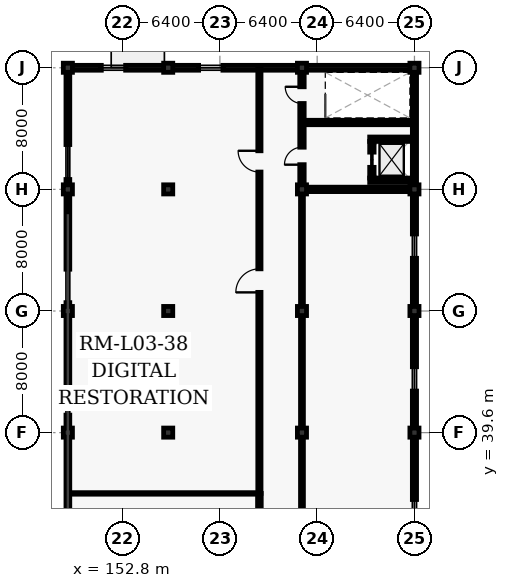
"""IFC4 building model, lengths in metres.
Left out: names, types, materials, properties, quantities, classifications, styles, units other than length and angle.
Written with IfcOpenShell. Run it as: python <this file> out.ifc"""

import sys

from ifc_helpers import new_model, si_unit, direction, frame, frame_2d, origin, origin_2d, place, context, subcontext, project, spatial, rectangle, extrude, element, fill, save


model = new_model("IFC4")
c1 = context("Model", 3, precision=1e-05, world=origin(), true_north=direction((0.0, 1.0)))
c2 = subcontext(c1, "Body", "Model", "MODEL_VIEW")
j1 = project(units=[si_unit("LENGTHUNIT", "METRE"), si_unit("PLANEANGLEUNIT", "RADIAN")], contexts=[c1])
p1 = place(None, origin())
s1 = spatial("IfcSite", under=j1, at=p1, CompositionType="ELEMENT")
p2 = place(p1, origin())
s2 = spatial("IfcBuilding", under=s1, at=p2, CompositionType="ELEMENT")
p3 = place(p2, frame((0.0, 0.0, 15.6)))
s3 = spatial("IfcBuildingStorey", under=s2, at=p3, CompositionType="ELEMENT", Elevation=15.6)
for number, where, z_axis, x_axis in (
    (1, (149.2, 39.6, 0.0), (0.0, 0.0, 1.0), (1.0, 0.0, 0.0)),
    (2, (149.2, 47.6, 0.0), (0.0, 0.0, 1.0), (1.0, 0.0, 0.0)),
    (3, (149.2, 55.6, 0.0), (0.0, 0.0, 1.0), (1.0, 0.0, 0.0)),
    (4, (149.2, 63.6, 0.0), (0.0, 0.0, 1.0), (1.0, 0.0, 0.0)),
    (5, (155.8, 39.6, 0.0), (0.0, 0.0, 1.0), (1.0, 0.0, 0.0)),
    (6, (155.8, 47.6, 0.0), (0.0, 0.0, 1.0), (1.0, 0.0, 0.0)),
    (7, (155.8, 55.6, 0.0), (0.0, 0.0, 1.0), (1.0, 0.0, 0.0)),
    (8, (155.8, 63.6, 0.0), (0.0, 0.0, 1.0), (1.0, 0.0, 0.0)),
    (9, (164.6, 39.6, 0.0), (0.0, 0.0, 1.0), (1.0, 0.0, 0.0)),
    (10, (164.6, 47.6, 0.0), (0.0, 0.0, 1.0), (1.0, 0.0, 0.0)),
    (11, (164.6, 55.6, 0.0), (0.0, 0.0, 1.0), (1.0, 0.0, 0.0)),
    (12, (164.6, 63.6, 0.0), (0.0, 0.0, 1.0), (1.0, 0.0, 0.0)),
    (13, (172.0, 39.6, 0.0), (0.0, 0.0, 1.0), (1.0, 0.0, 0.0)),
    (14, (172.0, 47.6, 0.0), (0.0, 0.0, 1.0), (1.0, 0.0, 0.0)),
    (15, (172.0, 55.6, 0.0), (0.0, 0.0, 1.0), (1.0, 0.0, 0.0)),
    (16, (172.0, 63.6, 0.0), (0.0, 0.0, 1.0), (1.0, 0.0, 0.0)),
):
    element("IfcColumn", number, at=place(p3, frame(where, z_axis=z_axis, x_axis=x_axis)), inside=s3, PredefinedType="COLUMN", context=c2, shape_type="SweptSolid", body=[
        extrude(rectangle(XDim=0.6, YDim=0.6, at=origin_2d()), origin(), (0.0, 0.0, 1.0), 4.8),
    ])
p4 = place(p3, frame((149.2, 15.6, 0.0), z_axis=(0.0, 0.0, 1.0), x_axis=(0.0, 1.0, 0.0)))
e17 = element("IfcWall", 17, at=p4, inside=s3, PredefinedType="SOLIDWALL", context=c2, shape_type="SweptSolid", body=[
    extrude(rectangle(XDim=48.0, YDim=0.25, at=frame_2d((24.0, 0.0))), origin(), (0.0, 0.0, 1.0), 3.705),
])
p5 = place(p4, frame((2.2, 0.0, 0.8)))
e18 = element("IfcOpeningElement", 18, at=p5, cuts=e17, PredefinedType="OPENING", context=c2, shape_type="SweptSolid", body=[
    extrude(rectangle(XDim=1.8, YDim=2.15, at=frame_2d((0.9, 1.075))), frame((0.0, 0.135, 0.0), z_axis=(0.0, -1.0, 0.0), x_axis=(1.0, 0.0, 0.0)), (0.0, 0.0, 1.0), 0.27),
])
p6 = place(p4, frame((9.6, 0.0, 0.8)))
e19 = element("IfcOpeningElement", 19, at=p6, cuts=e17, PredefinedType="OPENING", context=c2, shape_type="SweptSolid", body=[
    extrude(rectangle(XDim=1.9, YDim=2.2, at=frame_2d((0.95, 1.1))), frame((0.0, 0.135, 0.0), z_axis=(0.0, -1.0, 0.0), x_axis=(1.0, 0.0, 0.0)), (0.0, 0.0, 1.0), 0.27),
])
p7 = place(p4, frame((17.0, 0.0, 0.8)))
e20 = element("IfcOpeningElement", 20, at=p7, cuts=e17, PredefinedType="OPENING", context=c2, shape_type="SweptSolid", body=[
    extrude(rectangle(XDim=2.0, YDim=2.2, at=frame_2d((1.0, 1.1))), frame((0.0, 0.135, 0.0), z_axis=(0.0, -1.0, 0.0), x_axis=(1.0, 0.0, 0.0)), (0.0, 0.0, 1.0), 0.27),
])
p8 = place(p4, frame((25.15, 0.0, 0.8)))
e21 = element("IfcOpeningElement", 21, at=p8, cuts=e17, PredefinedType="OPENING", context=c2, shape_type="SweptSolid", body=[
    extrude(rectangle(XDim=2.1, YDim=2.2, at=frame_2d((1.05, 1.1))), frame((0.0, 0.135, 0.0), z_axis=(0.0, -1.0, 0.0), x_axis=(1.0, 0.0, 0.0)), (0.0, 0.0, 1.0), 0.27),
])
p9 = place(p4, frame((32.55, 0.0, 0.8)))
e22 = element("IfcOpeningElement", 22, at=p9, cuts=e17, PredefinedType="OPENING", context=c2, shape_type="SweptSolid", body=[
    extrude(rectangle(XDim=2.2, YDim=2.25, at=frame_2d((1.1, 1.125))), frame((0.0, 0.135, 0.0), z_axis=(0.0, -1.0, 0.0), x_axis=(1.0, 0.0, 0.0)), (0.0, 0.0, 1.0), 0.27),
])
p10 = place(p4, frame((40.65, 0.0, 0.8)))
e23 = element("IfcOpeningElement", 23, at=p10, cuts=e17, PredefinedType="OPENING", context=c2, shape_type="SweptSolid", body=[
    extrude(rectangle(XDim=2.3, YDim=2.25, at=frame_2d((1.15, 1.125))), frame((0.0, 0.135, 0.0), z_axis=(0.0, -1.0, 0.0), x_axis=(1.0, 0.0, 0.0)), (0.0, 0.0, 1.0), 0.27),
])
p11 = place(p3, frame((149.2, 63.6, 0.0), z_axis=(0.0, 0.0, 1.0), x_axis=(1.0, 0.0, 0.0)))
e24 = element("IfcWall", 24, at=p11, inside=s3, PredefinedType="SOLIDWALL", context=c2, shape_type="SweptSolid", body=[
    extrude(rectangle(XDim=22.8, YDim=0.32, at=frame_2d((11.4, 0.0))), origin(), (0.0, 0.0, 1.0), 3.705),
])
p12 = place(p11, frame((2.2, 0.0, 0.9)))
e25 = element("IfcOpeningElement", 25, at=p12, cuts=e24, PredefinedType="OPENING", context=c2, shape_type="SweptSolid", body=[
    extrude(rectangle(XDim=1.6, YDim=1.65, at=frame_2d((0.8, 0.825))), frame((0.0, 0.17, 0.0), z_axis=(0.0, -1.0, 0.0), x_axis=(1.0, 0.0, 0.0)), (0.0, 0.0, 1.0), 0.34),
])
p13 = place(p11, frame((8.6, 0.0, 0.9)))
e26 = element("IfcOpeningElement", 26, at=p13, cuts=e24, PredefinedType="OPENING", context=c2, shape_type="SweptSolid", body=[
    extrude(rectangle(XDim=1.6, YDim=1.65, at=frame_2d((0.8, 0.825))), frame((0.0, 0.17, 0.0), z_axis=(0.0, -1.0, 0.0), x_axis=(1.0, 0.0, 0.0)), (0.0, 0.0, 1.0), 0.34),
])
p14 = place(p3, frame((172.0, 63.6, 0.0), z_axis=(0.0, 0.0, 1.0), x_axis=(0.0, -1.0, 0.0)))
e27 = element("IfcWall", 27, at=p14, inside=s3, PredefinedType="SOLIDWALL", context=c2, shape_type="SweptSolid", body=[
    extrude(rectangle(XDim=56.0, YDim=0.275, at=frame_2d((28.0, 0.0))), origin(), (0.0, 0.0, 1.0), 3.705),
])
p15 = place(p14, frame((10.933, 0.0, 0.8)))
e28 = element("IfcOpeningElement", 28, at=p15, cuts=e27, PredefinedType="OPENING", context=c2, shape_type="SweptSolid", body=[
    extrude(rectangle(XDim=1.6, YDim=1.65, at=frame_2d((0.8, 0.825))), frame((0.0, 0.147, 0.0), z_axis=(0.0, -1.0, 0.0), x_axis=(1.0, 0.0, 0.0)), (0.0, 0.0, 1.0), 0.295),
])
p16 = place(p14, frame((19.667, 0.0, 0.8)))
e29 = element("IfcOpeningElement", 29, at=p16, cuts=e27, PredefinedType="OPENING", context=c2, shape_type="SweptSolid", body=[
    extrude(rectangle(XDim=1.6, YDim=1.65, at=frame_2d((0.8, 0.825))), frame((0.0, 0.147, 0.0), z_axis=(0.0, -1.0, 0.0), x_axis=(1.0, 0.0, 0.0)), (0.0, 0.0, 1.0), 0.295),
])
p17 = place(p14, frame((28.4, 0.0, 0.8)))
e30 = element("IfcOpeningElement", 30, at=p17, cuts=e27, PredefinedType="OPENING", context=c2, shape_type="SweptSolid", body=[
    extrude(rectangle(XDim=1.6, YDim=1.65, at=frame_2d((0.8, 0.825))), frame((0.0, 0.147, 0.0), z_axis=(0.0, -1.0, 0.0), x_axis=(1.0, 0.0, 0.0)), (0.0, 0.0, 1.0), 0.295),
])
p18 = place(p14, frame((37.133, 0.0, 0.8)))
e31 = element("IfcOpeningElement", 31, at=p18, cuts=e27, PredefinedType="OPENING", context=c2, shape_type="SweptSolid", body=[
    extrude(rectangle(XDim=1.6, YDim=1.65, at=frame_2d((0.8, 0.825))), frame((0.0, 0.147, 0.0), z_axis=(0.0, -1.0, 0.0), x_axis=(1.0, 0.0, 0.0)), (0.0, 0.0, 1.0), 0.295),
])
p19 = place(p14, frame((45.867, 0.0, 0.8)))
e32 = element("IfcOpeningElement", 32, at=p19, cuts=e27, PredefinedType="OPENING", context=c2, shape_type="SweptSolid", body=[
    extrude(rectangle(XDim=1.6, YDim=1.65, at=frame_2d((0.8, 0.825))), frame((0.0, 0.147, 0.0), z_axis=(0.0, -1.0, 0.0), x_axis=(1.0, 0.0, 0.0)), (0.0, 0.0, 1.0), 0.295),
])
p20 = place(p3, frame((164.902, 55.6, 0.0), z_axis=(0.0, 0.0, 1.0), x_axis=(1.0, 0.0, 0.0)))
e33 = element("IfcWall", 33, at=p20, inside=s3, PredefinedType="SHEAR", context=c2, shape_type="SweptSolid", body=[
    extrude(rectangle(XDim=6.796, YDim=0.29, at=frame_2d((3.398, 0.0))), origin(), (0.0, 0.0, 1.0), 4.555),
])
p21 = place(p3, frame((164.6, 55.902, 0.0), z_axis=(0.0, 0.0, 1.0), x_axis=(0.0, 1.0, 0.0)))
e34 = element("IfcWall", 34, at=p21, inside=s3, PredefinedType="SHEAR", context=c2, shape_type="SweptSolid", body=[
    extrude(rectangle(XDim=7.396, YDim=0.29, at=frame_2d((3.698, 0.0))), origin(), (0.0, 0.0, 1.0), 4.555),
])
p22 = place(p21, frame((5.348, 0.0, 0.0)))
e35 = element("IfcOpeningElement", 35, at=p22, cuts=e34, PredefinedType="OPENING", context=c2, shape_type="SweptSolid", body=[
    extrude(rectangle(XDim=1.1, YDim=2.15, at=frame_2d((0.55, 1.075))), frame((0.0, 0.155, 0.0), z_axis=(0.0, -1.0, 0.0), x_axis=(1.0, 0.0, 0.0)), (0.0, 0.0, 1.0), 0.31),
])
p23 = place(p21, frame((1.323, 0.0, 0.0)))
e36 = element("IfcOpeningElement", 36, at=p23, cuts=e34, PredefinedType="OPENING", context=c2, shape_type="SweptSolid", body=[
    extrude(rectangle(XDim=1.15, YDim=2.2, at=frame_2d((0.575, 1.1))), frame((0.0, 0.155, 0.0), z_axis=(0.0, -1.0, 0.0), x_axis=(1.0, 0.0, 0.0)), (0.0, 0.0, 1.0), 0.31),
])
p24 = place(p3, frame((164.745, 60.0, 0.0), z_axis=(0.0, 0.0, 1.0), x_axis=(1.0, 0.0, 0.0)))
e37 = element("IfcWall", 37, at=p24, inside=s3, PredefinedType="SHEAR", context=c2, shape_type="SweptSolid", body=[
    extrude(rectangle(XDim=7.11, YDim=0.29, at=frame_2d((3.555, 0.0))), origin(), (0.0, 0.0, 1.0), 4.555),
])
for number, where, z_axis, x_axis in (
    (38, (169.055, 56.2, 0.0), (0.0, 0.0, 1.0), (1.0, 0.0, 0.0)),
    (39, (169.055, 58.9, 0.0), (0.0, 0.0, 1.0), (1.0, 0.0, 0.0)),
):
    element("IfcWall", number, at=place(p3, frame(where, z_axis=z_axis, x_axis=x_axis)), inside=s3, PredefinedType="SHEAR", context=c2, shape_type="SweptSolid", body=[
        extrude(rectangle(XDim=2.89, YDim=0.29, at=frame_2d((1.445, 0.0))), origin(), (0.0, 0.0, 1.0), 4.555),
    ])
p25 = place(p3, frame((169.2, 56.345, 0.0), z_axis=(0.0, 0.0, 1.0), x_axis=(0.0, 1.0, 0.0)))
e40 = element("IfcWall", 40, at=p25, inside=s3, PredefinedType="SHEAR", context=c2, shape_type="SweptSolid", body=[
    extrude(rectangle(XDim=2.41, YDim=0.29, at=frame_2d((1.205, 0.0))), origin(), (0.0, 0.0, 1.0), 4.555),
])
p26 = place(p25, frame((0.705, 0.0, 0.0)))
e41 = element("IfcOpeningElement", 41, at=p26, cuts=e40, PredefinedType="OPENING", context=c2, shape_type="SweptSolid", body=[
    extrude(rectangle(XDim=1.0, YDim=2.15, at=frame_2d((0.5, 1.075))), frame((0.0, 0.155, 0.0), z_axis=(0.0, -1.0, 0.0), x_axis=(1.0, 0.0, 0.0)), (0.0, 0.0, 1.0), 0.31),
])
p27 = place(p3, frame((161.8, 7.6, 0.0), z_axis=(0.0, 0.0, 1.0), x_axis=(0.0, 1.0, 0.0)))
e42 = element("IfcWall", 42, at=p27, inside=s3, PredefinedType="PARTITIONING", context=c2, shape_type="SweptSolid", body=[
    extrude(rectangle(XDim=28.0, YDim=0.24, at=frame_2d((14.0, 0.0))), origin(), (0.0, 0.0, 1.0), 4.555),
])
p28 = place(p27, frame((13.475, 0.0, 0.0)))
e43 = element("IfcOpeningElement", 43, at=p28, cuts=e42, PredefinedType="OPENING", context=c2, shape_type="SweptSolid", body=[
    extrude(rectangle(XDim=1.05, YDim=2.15, at=frame_2d((0.525, 1.075))), frame((0.0, 0.13, 0.0), z_axis=(0.0, -1.0, 0.0), x_axis=(1.0, 0.0, 0.0)), (0.0, 0.0, 1.0), 0.26),
])
p29 = place(p27, frame((21.14, 0.0, 0.0)))
e44 = element("IfcOpeningElement", 44, at=p29, cuts=e42, PredefinedType="OPENING", context=c2, shape_type="SweptSolid", body=[
    extrude(rectangle(XDim=1.4, YDim=2.25, at=frame_2d((0.7, 1.125))), frame((0.0, 0.13, 0.0), z_axis=(0.0, -1.0, 0.0), x_axis=(1.0, 0.0, 0.0)), (0.0, 0.0, 1.0), 0.26),
])
p30 = place(p3, frame((161.8, 35.6, 0.0), z_axis=(0.0, 0.0, 1.0), x_axis=(0.0, 1.0, 0.0)))
e45 = element("IfcWall", 45, at=p30, inside=s3, PredefinedType="PARTITIONING", context=c2, shape_type="SweptSolid", body=[
    extrude(rectangle(XDim=28.0, YDim=0.21, at=frame_2d((14.0, 0.0))), origin(), (0.0, 0.0, 1.0), 4.555),
])
p31 = place(p30, frame((13.225, 0.0, 0.0)))
e46 = element("IfcOpeningElement", 46, at=p31, cuts=e45, PredefinedType="OPENING", context=c2, shape_type="SweptSolid", body=[
    extrude(rectangle(XDim=1.55, YDim=2.25, at=frame_2d((0.775, 1.125))), frame((0.0, 0.115, 0.0), z_axis=(0.0, -1.0, 0.0), x_axis=(1.0, 0.0, 0.0)), (0.0, 0.0, 1.0), 0.23),
])
p32 = place(p30, frame((21.14, 0.0, 0.0)))
e47 = element("IfcOpeningElement", 47, at=p32, cuts=e45, PredefinedType="OPENING", context=c2, shape_type="SweptSolid", body=[
    extrude(rectangle(XDim=1.4, YDim=2.25, at=frame_2d((0.7, 1.125))), frame((0.0, 0.115, 0.0), z_axis=(0.0, -1.0, 0.0), x_axis=(1.0, 0.0, 0.0)), (0.0, 0.0, 1.0), 0.23),
])
p33 = place(p3, frame((164.6, 55.298, 0.0), z_axis=(0.0, 0.0, 1.0), x_axis=(0.0, -1.0, 0.0)))
e48 = element("IfcWall", 48, at=p33, inside=s3, PredefinedType="PARTITIONING", context=c2, shape_type="SweptSolid", body=[
    extrude(rectangle(XDim=47.396, YDim=0.19, at=frame_2d((23.698, 0.0))), origin(), (0.0, 0.0, 1.0), 3.705),
])
p34 = place(p33, frame((24.18, 0.0, 0.0)))
e49 = element("IfcOpeningElement", 49, at=p34, cuts=e48, PredefinedType="OPENING", context=c2, shape_type="SweptSolid", body=[
    extrude(rectangle(XDim=1.6, YDim=2.3, at=frame_2d((0.8, 1.15))), frame((0.0, 0.105, 0.0), z_axis=(0.0, -1.0, 0.0), x_axis=(1.0, 0.0, 0.0)), (0.0, 0.0, 1.0), 0.21),
])
p35 = place(p33, frame((36.269, 0.0, 0.0)))
e50 = element("IfcOpeningElement", 50, at=p35, cuts=e48, PredefinedType="OPENING", context=c2, shape_type="SweptSolid", body=[
    extrude(rectangle(XDim=1.4, YDim=2.25, at=frame_2d((0.7, 1.125))), frame((0.0, 0.105, 0.0), z_axis=(0.0, -1.0, 0.0), x_axis=(1.0, 0.0, 0.0)), (0.0, 0.0, 1.0), 0.21),
])
p36 = place(p3, frame((149.2, 35.6, 0.0), z_axis=(0.0, 0.0, 1.0), x_axis=(1.0, 0.0, 0.0)))
e51 = element("IfcWall", 51, at=p36, inside=s3, PredefinedType="PARTITIONING", context=c2, shape_type="SweptSolid", body=[
    extrude(rectangle(XDim=12.6, YDim=0.1, at=frame_2d((6.3, 0.0))), origin(), (0.0, 0.0, 1.0), 4.005),
])
p37 = place(p8, origin())
e52 = element("IfcWindow", 52, at=p37, inside=s3, PartitioningType="SINGLE_PANEL", PredefinedType="WINDOW", context=c2, shape_type="SweptSolid", body=[
    extrude(rectangle(XDim=2.1, YDim=2.2, at=frame_2d((1.05, 1.1))), frame((0.0, 0.03, 0.0), z_axis=(0.0, -1.0, 0.0), x_axis=(1.0, 0.0, 0.0)), (0.0, 0.0, 1.0), 0.06),
])
fill(e21, e52)
p38 = place(p9, origin())
e53 = element("IfcWindow", 53, at=p38, inside=s3, PartitioningType="SINGLE_PANEL", PredefinedType="WINDOW", context=c2, shape_type="SweptSolid", body=[
    extrude(rectangle(XDim=2.2, YDim=2.25, at=frame_2d((1.1, 1.125))), frame((0.0, 0.03, 0.0), z_axis=(0.0, -1.0, 0.0), x_axis=(1.0, 0.0, 0.0)), (0.0, 0.0, 1.0), 0.06),
])
fill(e22, e53)
p39 = place(p10, origin())
e54 = element("IfcWindow", 54, at=p39, inside=s3, PartitioningType="SINGLE_PANEL", PredefinedType="WINDOW", context=c2, shape_type="SweptSolid", body=[
    extrude(rectangle(XDim=2.3, YDim=2.25, at=frame_2d((1.15, 1.125))), frame((0.0, 0.03, 0.0), z_axis=(0.0, -1.0, 0.0), x_axis=(1.0, 0.0, 0.0)), (0.0, 0.0, 1.0), 0.06),
])
fill(e23, e54)
p40 = place(p12, origin())
e55 = element("IfcWindow", 55, at=p40, inside=s3, PartitioningType="SINGLE_PANEL", PredefinedType="WINDOW", context=c2, shape_type="SweptSolid", body=[
    extrude(rectangle(XDim=1.6, YDim=1.65, at=frame_2d((0.8, 0.825))), frame((0.0, 0.03, 0.0), z_axis=(0.0, -1.0, 0.0), x_axis=(1.0, 0.0, 0.0)), (0.0, 0.0, 1.0), 0.06),
])
fill(e25, e55)
p41 = place(p13, origin())
e56 = element("IfcWindow", 56, at=p41, inside=s3, PartitioningType="SINGLE_PANEL", PredefinedType="WINDOW", context=c2, shape_type="SweptSolid", body=[
    extrude(rectangle(XDim=1.6, YDim=1.65, at=frame_2d((0.8, 0.825))), frame((0.0, 0.03, 0.0), z_axis=(0.0, -1.0, 0.0), x_axis=(1.0, 0.0, 0.0)), (0.0, 0.0, 1.0), 0.06),
])
fill(e26, e56)
p42 = place(p15, origin())
e57 = element("IfcWindow", 57, at=p42, inside=s3, PartitioningType="SINGLE_PANEL", PredefinedType="WINDOW", context=c2, shape_type="SweptSolid", body=[
    extrude(rectangle(XDim=1.6, YDim=1.65, at=frame_2d((0.8, 0.825))), frame((0.0, 0.03, 0.0), z_axis=(0.0, -1.0, 0.0), x_axis=(1.0, 0.0, 0.0)), (0.0, 0.0, 1.0), 0.06),
])
fill(e28, e57)
p43 = place(p16, origin())
e58 = element("IfcWindow", 58, at=p43, inside=s3, PartitioningType="SINGLE_PANEL", PredefinedType="WINDOW", context=c2, shape_type="SweptSolid", body=[
    extrude(rectangle(XDim=1.6, YDim=1.65, at=frame_2d((0.8, 0.825))), frame((0.0, 0.03, 0.0), z_axis=(0.0, -1.0, 0.0), x_axis=(1.0, 0.0, 0.0)), (0.0, 0.0, 1.0), 0.06),
])
fill(e29, e58)
p44 = place(p17, origin())
e59 = element("IfcWindow", 59, at=p44, inside=s3, PartitioningType="SINGLE_PANEL", PredefinedType="WINDOW", context=c2, shape_type="SweptSolid", body=[
    extrude(rectangle(XDim=1.6, YDim=1.65, at=frame_2d((0.8, 0.825))), frame((0.0, 0.03, 0.0), z_axis=(0.0, -1.0, 0.0), x_axis=(1.0, 0.0, 0.0)), (0.0, 0.0, 1.0), 0.06),
])
fill(e30, e59)
p45 = place(p22, origin())
e60 = element("IfcDoor", 60, at=p45, inside=s3, OperationType="SINGLE_SWING_RIGHT", PredefinedType="DOOR", context=c2, shape_type="SweptSolid", body=[
    extrude(rectangle(XDim=1.1, YDim=2.15, at=frame_2d((0.55, 1.075))), frame((0.0, 0.025, 0.0), z_axis=(0.0, -1.0, 0.0), x_axis=(1.0, 0.0, 0.0)), (0.0, 0.0, 1.0), 0.05),
])
fill(e35, e60)
p46 = place(p23, origin())
e61 = element("IfcDoor", 61, at=p46, inside=s3, OperationType="SINGLE_SWING_LEFT", PredefinedType="DOOR", context=c2, shape_type="SweptSolid", body=[
    extrude(rectangle(XDim=1.15, YDim=2.2, at=frame_2d((0.575, 1.1))), frame((0.0, 0.025, 0.0), z_axis=(0.0, -1.0, 0.0), x_axis=(1.0, 0.0, 0.0)), (0.0, 0.0, 1.0), 0.05),
])
fill(e36, e61)
p47 = place(p26, origin())
e62 = element("IfcDoor", 62, at=p47, inside=s3, OperationType="SLIDING_TO_LEFT", PredefinedType="DOOR", context=c2, shape_type="SweptSolid", body=[
    extrude(rectangle(XDim=1.0, YDim=2.15, at=frame_2d((0.5, 1.075))), frame((0.0, 0.025, 0.0), z_axis=(0.0, -1.0, 0.0), x_axis=(1.0, 0.0, 0.0)), (0.0, 0.0, 1.0), 0.05),
])
fill(e41, e62)
p48 = place(p31, origin())
e63 = element("IfcDoor", 63, at=p48, inside=s3, OperationType="SINGLE_SWING_LEFT", PredefinedType="DOOR", context=c2, shape_type="SweptSolid", body=[
    extrude(rectangle(XDim=1.55, YDim=2.25, at=frame_2d((0.775, 1.125))), frame((0.0, 0.025, 0.0), z_axis=(0.0, -1.0, 0.0), x_axis=(1.0, 0.0, 0.0)), (0.0, 0.0, 1.0), 0.05),
])
fill(e46, e63)
p49 = place(p32, origin())
e64 = element("IfcDoor", 64, at=p49, inside=s3, OperationType="SINGLE_SWING_RIGHT", PredefinedType="DOOR", context=c2, shape_type="SweptSolid", body=[
    extrude(rectangle(XDim=1.4, YDim=2.25, at=frame_2d((0.7, 1.125))), frame((0.0, 0.025, 0.0), z_axis=(0.0, -1.0, 0.0), x_axis=(1.0, 0.0, 0.0)), (0.0, 0.0, 1.0), 0.05),
])
fill(e47, e64)
save(model, sys.argv[1])
